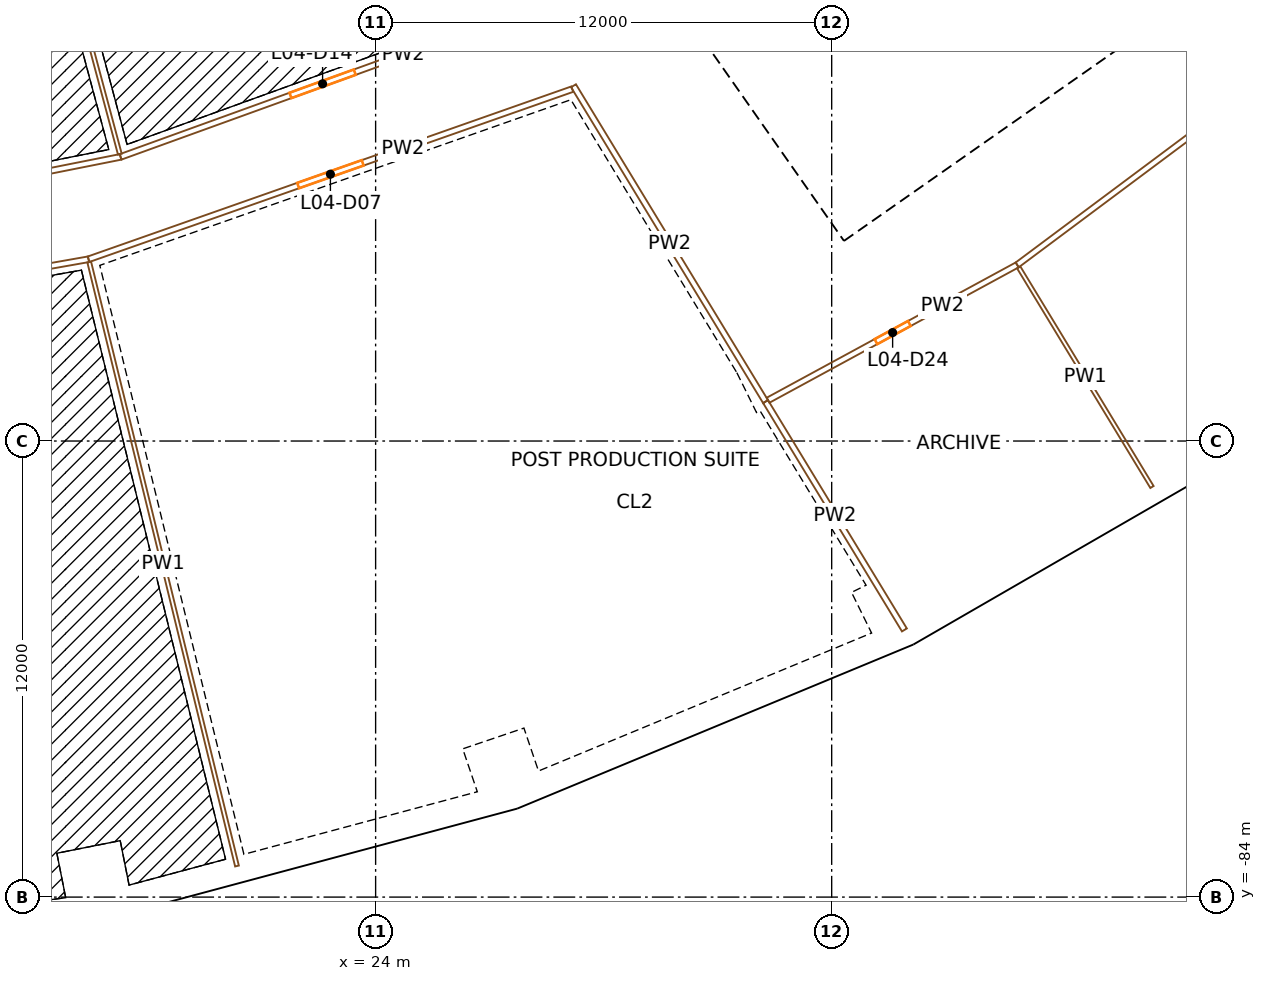
"""IFC4 building model, lengths in metres.
Left out: names, types, materials, properties, quantities, classifications, styles, units other than length and angle.
Written with IfcOpenShell. Run it as: python <this file> out.ifc"""

import sys

from ifc_helpers import new_model, si_unit, direction, frame, frame_2d, origin, origin_2d, place, context, subcontext, project, spatial, rectangle, extrude, element, fill, save


model = new_model("IFC4")
c1 = context("Model", 3, precision=1e-05, world=origin(), true_north=direction((0.0, 1.0)))
c2 = subcontext(c1, "Body", "Model", "MODEL_VIEW")
j1 = project(units=[si_unit("LENGTHUNIT", "METRE"), si_unit("PLANEANGLEUNIT", "RADIAN")], contexts=[c1])
p1 = place(None, origin())
s1 = spatial("IfcSite", under=j1, at=p1, CompositionType="ELEMENT")
p2 = place(p1, origin())
s2 = spatial("IfcBuilding", under=s1, at=p2, CompositionType="ELEMENT")
p3 = place(p2, frame((0.0, 0.0, 31.5)))
s3 = spatial("IfcBuildingStorey", under=s2, at=p3, CompositionType="ELEMENT", Elevation=31.5)
p4 = place(p3, frame((15.168, -76.256, 0.0), z_axis=(0.0, 0.0, 1.0), x_axis=(0.980785280403, 0.195090322016, 0.0)))
e1 = element("IfcColumn", 1, at=p4, inside=s3, PredefinedType="COLUMN", context=c2, shape_type="SweptSolid", body=[
    extrude(rectangle(XDim=1.4, YDim=1.8, at=origin_2d()), origin(), (0.0, 0.0, 1.0), 4.5),
])
p5 = place(p3, frame((16.631, -83.612, 0.0), z_axis=(0.0, 0.0, 1.0), x_axis=(0.980785280403, 0.195090322016, 0.0)))
e2 = element("IfcColumn", 2, at=p5, inside=s3, PredefinedType="COLUMN", context=c2, shape_type="SweptSolid", body=[
    extrude(rectangle(XDim=1.1, YDim=1.3, at=origin_2d()), origin(), (0.0, 0.0, 1.0), 4.5),
])
p6 = place(p3, frame((24.992, -73.624, 0.0), z_axis=(0.0, 0.0, 1.0), x_axis=(0.946930129495, 0.321439465303, 0.0)))
e3 = element("IfcColumn", 3, at=p6, inside=s3, PredefinedType="COLUMN", context=c2, shape_type="SweptSolid", body=[
    extrude(rectangle(XDim=1.4, YDim=1.8, at=origin_2d()), origin(), (0.0, 0.0, 1.0), 4.5),
])
p7 = place(p3, frame((27.403, -80.726, 0.0), z_axis=(0.0, 0.0, 1.0), x_axis=(0.946930129495, 0.321439465303, 0.0)))
e4 = element("IfcColumn", 4, at=p7, inside=s3, PredefinedType="COLUMN", context=c2, shape_type="SweptSolid", body=[
    extrude(rectangle(XDim=1.1, YDim=1.3, at=origin_2d()), origin(), (0.0, 0.0, 1.0), 4.5),
])
p8 = place(p3, frame((34.388, -69.732, 0.0), z_axis=(0.0, 0.0, 1.0), x_axis=(0.896872741533, 0.442288690219, 0.0)))
e5 = element("IfcColumn", 5, at=p8, inside=s3, PredefinedType="COLUMN", context=c2, shape_type="SweptSolid", body=[
    extrude(rectangle(XDim=1.4, YDim=1.8, at=origin_2d()), origin(), (0.0, 0.0, 1.0), 4.5),
])
p9 = place(p3, frame((37.705, -76.458, 0.0), z_axis=(0.0, 0.0, 1.0), x_axis=(0.896872741533, 0.442288690219, 0.0)))
e6 = element("IfcColumn", 6, at=p9, inside=s3, PredefinedType="COLUMN", context=c2, shape_type="SweptSolid", body=[
    extrude(rectangle(XDim=1.1, YDim=1.3, at=origin_2d()), origin(), (0.0, 0.0, 1.0), 4.5),
])
p10 = place(p3, frame((43.196, -64.647, 0.0), z_axis=(0.0, 0.0, 1.0), x_axis=(0.831469612303, 0.55557023302, 0.0)))
e7 = element("IfcColumn", 7, at=p10, inside=s3, PredefinedType="COLUMN", context=c2, shape_type="SweptSolid", body=[
    extrude(rectangle(XDim=1.4, YDim=1.8, at=origin_2d()), origin(), (0.0, 0.0, 1.0), 4.5),
])
p11 = place(p3, frame((36.717, -66.337, 0.0), z_axis=(0.0, 0.0, 1.0), x_axis=(-0.573577477574, 0.819151315216, 0.0)))
e8 = element("IfcWall", 8, at=p11, inside=s3, PredefinedType="SHEAR", context=c2, shape_type="SweptSolid", body=[
    extrude(rectangle(XDim=14.8, YDim=0.9, at=frame_2d((7.4, 0.0))), origin(), (0.0, 0.0, 1.0), 4.1),
])
p12 = place(p11, frame((6.2, 0.0, 0.0)))
e9 = element("IfcOpeningElement", 9, at=p12, cuts=e8, PredefinedType="OPENING", context=c2, shape_type="SweptSolid", body=[
    extrude(rectangle(XDim=2.4, YDim=2.1, at=frame_2d((1.2, 1.05))), frame((0.0, 0.46, 0.0), z_axis=(0.0, -1.0, 0.0), x_axis=(1.0, 0.0, 0.0)), (0.0, 0.0, 1.0), 0.92),
])
p13 = place(p3, frame((36.827, -65.71, 0.0), z_axis=(0.0, 0.0, 1.0), x_axis=(0.819153391756, 0.573574511963, 0.0)))
e10 = element("IfcWall", 10, at=p13, inside=s3, PredefinedType="SHEAR", context=c2, shape_type="SweptSolid", body=[
    extrude(rectangle(XDim=15.045, YDim=0.9, at=frame_2d((7.523, 0.0))), origin(), (0.0, 0.0, 1.0), 4.1),
])
p14 = place(p13, frame((0.6, 0.0, 0.0)))
e11 = element("IfcOpeningElement", 11, at=p14, cuts=e10, PredefinedType="OPENING", context=c2, shape_type="SweptSolid", body=[
    extrude(rectangle(XDim=1.0, YDim=2.1, at=frame_2d((0.5, 1.05))), frame((0.0, 0.46, 0.0), z_axis=(0.0, -1.0, 0.0), x_axis=(1.0, 0.0, 0.0)), (0.0, 0.0, 1.0), 0.92),
])
p15 = place(p13, frame((3.275, 0.0, 0.0)))
e12 = element("IfcOpeningElement", 12, at=p15, cuts=e10, PredefinedType="OPENING", context=c2, shape_type="SweptSolid", body=[
    extrude(rectangle(XDim=1.0, YDim=2.1, at=frame_2d((0.5, 1.05))), frame((0.0, 0.46, 0.0), z_axis=(0.0, -1.0, 0.0), x_axis=(1.0, 0.0, 0.0)), (0.0, 0.0, 1.0), 0.92),
])
p16 = place(p13, frame((6.175, 0.0, 0.0)))
e13 = element("IfcOpeningElement", 13, at=p16, cuts=e10, PredefinedType="OPENING", context=c2, shape_type="SweptSolid", body=[
    extrude(rectangle(XDim=1.0, YDim=2.1, at=frame_2d((0.5, 1.05))), frame((0.0, 0.46, 0.0), z_axis=(0.0, -1.0, 0.0), x_axis=(1.0, 0.0, 0.0)), (0.0, 0.0, 1.0), 0.92),
])
p17 = place(p13, frame((13.495, 0.0, 0.0)))
e14 = element("IfcOpeningElement", 14, at=p17, cuts=e10, PredefinedType="OPENING", context=c2, shape_type="SweptSolid", body=[
    extrude(rectangle(XDim=1.1, YDim=2.1, at=frame_2d((0.55, 1.05))), frame((0.0, 0.46, 0.0), z_axis=(0.0, -1.0, 0.0), x_axis=(1.0, 0.0, 0.0)), (0.0, 0.0, 1.0), 0.92),
])
p18 = place(p3, frame((35.221, -63.417, 0.0), z_axis=(0.0, 0.0, 1.0), x_axis=(0.819166993208, 0.573555086491, 0.0)))
e15 = element("IfcWall", 15, at=p18, inside=s3, PredefinedType="SOLIDWALL", context=c2, shape_type="SweptSolid", body=[
    extrude(rectangle(XDim=7.95, YDim=0.3, at=frame_2d((3.975, 0.0))), origin(), (0.0, 0.0, 1.0), 4.1),
])
for number, where, z_axis, x_axis in (
    (16, (37.15, -62.249, 0.0), (0.0, 0.0, 1.0), (0.574, -0.819, 0.0)),
    (17, (39.649, -60.5, 0.0), (0.0, 0.0, 1.0), (0.574, -0.819, 0.0)),
):
    element("IfcWall", number, at=place(p3, frame(where, z_axis=z_axis, x_axis=x_axis)), inside=s3, PredefinedType="PLUMBINGWALL", context=c2, shape_type="SweptSolid", body=[
        extrude(rectangle(XDim=2.2, YDim=0.1, at=frame_2d((1.1, 0.0))), origin(), (0.0, 0.0, 1.0), 4.1),
    ])
p19 = place(p3, frame((16.754, -84.379, 0.0), z_axis=(0.0, 0.0, 1.0), x_axis=(0.965923678926, 0.258827059038, 0.0)))
e18 = element("IfcWall", 18, at=p19, inside=s3, PredefinedType="SOLIDWALL", context=c2, shape_type="SweptSolid", body=[
    extrude(rectangle(XDim=11.312, YDim=0.45, at=frame_2d((5.656, 0.0))), origin(), (0.0, 0.0, 1.0), 3.2),
])
p20 = place(p19, frame((4.006, 0.0, 0.9)))
e19 = element("IfcOpeningElement", 19, at=p20, cuts=e18, PredefinedType="OPENING", context=c2, shape_type="SweptSolid", body=[
    extrude(rectangle(XDim=1.2, YDim=2.15, at=frame_2d((0.6, 1.075))), frame((0.0, 0.235, 0.0), z_axis=(0.0, -1.0, 0.0), x_axis=(1.0, 0.0, 0.0)), (0.0, 0.0, 1.0), 0.47),
])
p21 = place(p19, frame((6.106, 0.0, 0.9)))
e20 = element("IfcOpeningElement", 20, at=p21, cuts=e18, PredefinedType="OPENING", context=c2, shape_type="SweptSolid", body=[
    extrude(rectangle(XDim=1.2, YDim=2.15, at=frame_2d((0.6, 1.075))), frame((0.0, 0.235, 0.0), z_axis=(0.0, -1.0, 0.0), x_axis=(1.0, 0.0, 0.0)), (0.0, 0.0, 1.0), 0.47),
])
p22 = place(p3, frame((27.706, -81.437, 0.0), z_axis=(0.0, 0.0, 1.0), x_axis=(0.923874126662, 0.382696482978, 0.0)))
e21 = element("IfcWall", 21, at=p22, inside=s3, PredefinedType="SOLIDWALL", context=c2, shape_type="SweptSolid", body=[
    extrude(rectangle(XDim=11.135, YDim=0.45, at=frame_2d((5.567, 0.0))), origin(), (0.0, 0.0, 1.0), 3.2),
])
p23 = place(p22, frame((3.917, 0.0, 0.9)))
e22 = element("IfcOpeningElement", 22, at=p23, cuts=e21, PredefinedType="OPENING", context=c2, shape_type="SweptSolid", body=[
    extrude(rectangle(XDim=1.2, YDim=2.15, at=frame_2d((0.6, 1.075))), frame((0.0, 0.235, 0.0), z_axis=(0.0, -1.0, 0.0), x_axis=(1.0, 0.0, 0.0)), (0.0, 0.0, 1.0), 0.47),
])
p24 = place(p22, frame((6.017, 0.0, 0.9)))
e23 = element("IfcOpeningElement", 23, at=p24, cuts=e21, PredefinedType="OPENING", context=c2, shape_type="SweptSolid", body=[
    extrude(rectangle(XDim=1.2, YDim=2.15, at=frame_2d((0.6, 1.075))), frame((0.0, 0.235, 0.0), z_axis=(0.0, -1.0, 0.0), x_axis=(1.0, 0.0, 0.0)), (0.0, 0.0, 1.0), 0.47),
])
p25 = place(p3, frame((38.022, -77.168, 0.0), z_axis=(0.0, 0.0, 1.0), x_axis=(0.866024577697, 0.500001430823, 0.0)))
e24 = element("IfcWall", 24, at=p25, inside=s3, PredefinedType="SOLIDWALL", context=c2, shape_type="SweptSolid", body=[
    extrude(rectangle(XDim=11.312, YDim=0.45, at=frame_2d((5.656, 0.0))), origin(), (0.0, 0.0, 1.0), 3.2),
])
p26 = place(p25, frame((4.006, 0.0, 0.9)))
e25 = element("IfcOpeningElement", 25, at=p26, cuts=e24, PredefinedType="OPENING", context=c2, shape_type="SweptSolid", body=[
    extrude(rectangle(XDim=1.2, YDim=2.15, at=frame_2d((0.6, 1.075))), frame((0.0, 0.235, 0.0), z_axis=(0.0, -1.0, 0.0), x_axis=(1.0, 0.0, 0.0)), (0.0, 0.0, 1.0), 0.47),
])
p27 = place(p25, frame((6.106, 0.0, 0.9)))
e26 = element("IfcOpeningElement", 26, at=p27, cuts=e24, PredefinedType="OPENING", context=c2, shape_type="SweptSolid", body=[
    extrude(rectangle(XDim=1.2, YDim=2.15, at=frame_2d((0.6, 1.075))), frame((0.0, 0.235, 0.0), z_axis=(0.0, -1.0, 0.0), x_axis=(1.0, 0.0, 0.0)), (0.0, 0.0, 1.0), 0.47),
])
p28 = place(p3, frame((16.446, -67.217, 0.0), z_axis=(0.0, 0.0, 1.0), x_axis=(-0.984813412134, -0.173616080133, 0.0)))
e27 = element("IfcWall", 27, at=p28, inside=s3, PredefinedType="PARTITIONING", context=c2, shape_type="SweptSolid", body=[
    extrude(rectangle(XDim=9.052, YDim=0.15, at=frame_2d((4.526, 0.0))), origin(), (0.0, 0.0, 1.0), 3.1),
])
p29 = place(p28, frame((3.626, 0.0, 0.0)))
e28 = element("IfcOpeningElement", 28, at=p29, cuts=e27, PredefinedType="OPENING", context=c2, shape_type="SweptSolid", body=[
    extrude(rectangle(XDim=1.8, YDim=2.1, at=frame_2d((0.9, 1.05))), frame((0.0, 0.085, 0.0), z_axis=(0.0, -1.0, 0.0), x_axis=(1.0, 0.0, 0.0)), (0.0, 0.0, 1.0), 0.17),
])
p30 = place(p3, frame((8.719, -66.229, 0.0), z_axis=(0.0, 0.0, 1.0), x_axis=(0.980786466832, 0.195084357342, 0.0)))
e29 = element("IfcWall", 29, at=p30, inside=s3, PredefinedType="PARTITIONING", context=c2, shape_type="SweptSolid", body=[
    extrude(rectangle(XDim=8.738, YDim=0.15, at=frame_2d((4.369, 0.0))), origin(), (0.0, 0.0, 1.0), 3.1),
])
p31 = place(p30, frame((3.869, 0.0, 0.0)))
e30 = element("IfcOpeningElement", 30, at=p31, cuts=e29, PredefinedType="OPENING", context=c2, shape_type="SweptSolid", body=[
    extrude(rectangle(XDim=1.0, YDim=2.1, at=frame_2d((0.5, 1.05))), frame((0.0, 0.085, 0.0), z_axis=(0.0, -1.0, 0.0), x_axis=(1.0, 0.0, 0.0)), (0.0, 0.0, 1.0), 0.17),
])
p32 = place(p3, frame((12.965, -48.386, 0.0), z_axis=(0.0, 0.0, 1.0), x_axis=(0.258824622624, -0.965924331779, 0.0)))
e31 = element("IfcWall", 31, at=p32, inside=s3, PredefinedType="PARTITIONING", context=c2, shape_type="SweptSolid", body=[
    extrude(rectangle(XDim=16.632, YDim=0.1, at=frame_2d((8.316, 0.0))), origin(), (0.0, 0.0, 1.0), 3.1),
])
p33 = place(p3, frame((29.175, -62.741, 0.0), z_axis=(0.0, 0.0, 1.0), x_axis=(-0.94336986797, -0.33174281033, 0.0)))
e32 = element("IfcWall", 32, at=p33, inside=s3, PredefinedType="PARTITIONING", context=c2, shape_type="SweptSolid", body=[
    extrude(rectangle(XDim=13.493, YDim=0.15, at=frame_2d((6.746, 0.0))), origin(), (0.0, 0.0, 1.0), 3.1),
])
p34 = place(p33, frame((5.846, 0.0, 0.0)))
e33 = element("IfcOpeningElement", 33, at=p34, cuts=e32, PredefinedType="OPENING", context=c2, shape_type="SweptSolid", body=[
    extrude(rectangle(XDim=1.8, YDim=2.1, at=frame_2d((0.9, 1.05))), frame((0.0, 0.085, 0.0), z_axis=(0.0, -1.0, 0.0), x_axis=(1.0, 0.0, 0.0)), (0.0, 0.0, 1.0), 0.17),
])
p35 = place(p3, frame((17.289, -64.524, 0.0), z_axis=(0.0, 0.0, 1.0), x_axis=(0.940369024046, 0.340155991589, 0.0)))
e34 = element("IfcWall", 34, at=p35, inside=s3, PredefinedType="PARTITIONING", context=c2, shape_type="SweptSolid", body=[
    extrude(rectangle(XDim=11.305, YDim=0.15, at=frame_2d((5.652, 0.0))), origin(), (0.0, 0.0, 1.0), 3.1),
])
p36 = place(p35, frame((4.752, 0.0, 0.0)))
e35 = element("IfcOpeningElement", 35, at=p36, cuts=e34, PredefinedType="OPENING", context=c2, shape_type="SweptSolid", body=[
    extrude(rectangle(XDim=1.8, YDim=2.1, at=frame_2d((0.9, 1.05))), frame((0.0, 0.085, 0.0), z_axis=(0.0, -1.0, 0.0), x_axis=(1.0, 0.0, 0.0)), (0.0, 0.0, 1.0), 0.17),
])
p37 = place(p3, frame((20.352, -83.182, 0.0), z_axis=(0.0, 0.0, 1.0), x_axis=(-0.23765209547, 0.971350339228, 0.0)))
e36 = element("IfcWall", 36, at=p37, inside=s3, PredefinedType="PARTITIONING", context=c2, shape_type="SweptSolid", body=[
    extrude(rectangle(XDim=16.361, YDim=0.1, at=frame_2d((8.18, 0.0))), origin(), (0.0, 0.0, 1.0), 3.1),
])
p38 = place(p3, frame((29.207, -62.652, 0.0), z_axis=(0.0, 0.0, 1.0), x_axis=(0.519573423316, -0.854425805897, 0.0)))
e37 = element("IfcWall", 37, at=p38, inside=s3, PredefinedType="PARTITIONING", context=c2, shape_type="SweptSolid", body=[
    extrude(rectangle(XDim=9.726, YDim=0.15, at=frame_2d((4.863, 0.0))), origin(), (0.0, 0.0, 1.0), 3.1),
])
p39 = place(p3, frame((34.26, -70.963, 0.0), z_axis=(0.0, 0.0, 1.0), x_axis=(0.519582317334, -0.854420397412, 0.0)))
e38 = element("IfcWall", 38, at=p39, inside=s3, PredefinedType="PARTITIONING", context=c2, shape_type="SweptSolid", body=[
    extrude(rectangle(XDim=7.032, YDim=0.15, at=frame_2d((3.516, 0.0))), origin(), (0.0, 0.0, 1.0), 3.1),
])
p40 = place(p3, frame((40.881, -67.366, 0.0), z_axis=(0.0, 0.0, 1.0), x_axis=(-0.87872597875, -0.477326569835, 0.0)))
e39 = element("IfcWall", 39, at=p40, inside=s3, PredefinedType="PARTITIONING", context=c2, shape_type="SweptSolid", body=[
    extrude(rectangle(XDim=7.46, YDim=0.15, at=frame_2d((3.73, 0.0))), origin(), (0.0, 0.0, 1.0), 3.1),
])
p41 = place(p40, frame((3.23, 0.0, 0.0)))
e40 = element("IfcOpeningElement", 40, at=p41, cuts=e39, PredefinedType="OPENING", context=c2, shape_type="SweptSolid", body=[
    extrude(rectangle(XDim=1.0, YDim=2.1, at=frame_2d((0.5, 1.05))), frame((0.0, 0.085, 0.0), z_axis=(0.0, -1.0, 0.0), x_axis=(1.0, 0.0, 0.0)), (0.0, 0.0, 1.0), 0.17),
])
p42 = place(p3, frame((52.875, -58.417, 0.0), z_axis=(0.0, 0.0, 1.0), x_axis=(-0.801483412858, -0.598017005539, 0.0)))
e41 = element("IfcWall", 41, at=p42, inside=s3, PredefinedType="PARTITIONING", context=c2, shape_type="SweptSolid", body=[
    extrude(rectangle(XDim=14.965, YDim=0.15, at=frame_2d((7.483, 0.0))), origin(), (0.0, 0.0, 1.0), 3.1),
])
p43 = place(p42, frame((6.983, 0.0, 0.0)))
e42 = element("IfcOpeningElement", 42, at=p43, cuts=e41, PredefinedType="OPENING", context=c2, shape_type="SweptSolid", body=[
    extrude(rectangle(XDim=1.0, YDim=2.1, at=frame_2d((0.5, 1.05))), frame((0.0, 0.085, 0.0), z_axis=(0.0, -1.0, 0.0), x_axis=(1.0, 0.0, 0.0)), (0.0, 0.0, 1.0), 0.17),
])
p44 = place(p3, frame((44.428, -73.21, 0.0), z_axis=(0.0, 0.0, 1.0), x_axis=(-0.518790606157, 0.85490134341, 0.0)))
e43 = element("IfcWall", 43, at=p44, inside=s3, PredefinedType="PARTITIONING", context=c2, shape_type="SweptSolid", body=[
    extrude(rectangle(XDim=6.761, YDim=0.1, at=frame_2d((3.38, 0.0))), origin(), (0.0, 0.0, 1.0), 3.1),
])
p45 = place(p14, origin())
e44 = element("IfcDoor", 44, at=p45, inside=s3, OperationType="SINGLE_SWING_RIGHT", PredefinedType="DOOR", context=c2, shape_type="SweptSolid", body=[
    extrude(rectangle(XDim=1.0, YDim=2.1, at=frame_2d((0.5, 1.05))), frame((0.0, 0.025, 0.0), z_axis=(0.0, -1.0, 0.0), x_axis=(1.0, 0.0, 0.0)), (0.0, 0.0, 1.0), 0.05),
])
fill(e11, e44)
p46 = place(p15, origin())
e45 = element("IfcDoor", 45, at=p46, inside=s3, OperationType="SINGLE_SWING_LEFT", PredefinedType="DOOR", context=c2, shape_type="SweptSolid", body=[
    extrude(rectangle(XDim=1.0, YDim=2.1, at=frame_2d((0.5, 1.05))), frame((0.0, 0.025, 0.0), z_axis=(0.0, -1.0, 0.0), x_axis=(1.0, 0.0, 0.0)), (0.0, 0.0, 1.0), 0.05),
])
fill(e12, e45)
p47 = place(p16, origin())
e46 = element("IfcDoor", 46, at=p47, inside=s3, OperationType="SINGLE_SWING_RIGHT", PredefinedType="DOOR", context=c2, shape_type="SweptSolid", body=[
    extrude(rectangle(XDim=1.0, YDim=2.1, at=frame_2d((0.5, 1.05))), frame((0.0, 0.025, 0.0), z_axis=(0.0, -1.0, 0.0), x_axis=(1.0, 0.0, 0.0)), (0.0, 0.0, 1.0), 0.05),
])
fill(e13, e46)
p48 = place(p20, origin())
e47 = element("IfcWindow", 47, at=p48, inside=s3, PartitioningType="SINGLE_PANEL", PredefinedType="WINDOW", context=c2, shape_type="SweptSolid", body=[
    extrude(rectangle(XDim=1.2, YDim=2.15, at=frame_2d((0.6, 1.075))), frame((0.0, 0.03, 0.0), z_axis=(0.0, -1.0, 0.0), x_axis=(1.0, 0.0, 0.0)), (0.0, 0.0, 1.0), 0.06),
])
fill(e19, e47)
p49 = place(p21, origin())
e48 = element("IfcWindow", 48, at=p49, inside=s3, PartitioningType="SINGLE_PANEL", PredefinedType="WINDOW", context=c2, shape_type="SweptSolid", body=[
    extrude(rectangle(XDim=1.2, YDim=2.15, at=frame_2d((0.6, 1.075))), frame((0.0, 0.03, 0.0), z_axis=(0.0, -1.0, 0.0), x_axis=(1.0, 0.0, 0.0)), (0.0, 0.0, 1.0), 0.06),
])
fill(e20, e48)
p50 = place(p23, origin())
e49 = element("IfcWindow", 49, at=p50, inside=s3, PartitioningType="SINGLE_PANEL", PredefinedType="WINDOW", context=c2, shape_type="SweptSolid", body=[
    extrude(rectangle(XDim=1.2, YDim=2.15, at=frame_2d((0.6, 1.075))), frame((0.0, 0.03, 0.0), z_axis=(0.0, -1.0, 0.0), x_axis=(1.0, 0.0, 0.0)), (0.0, 0.0, 1.0), 0.06),
])
fill(e22, e49)
p51 = place(p24, origin())
e50 = element("IfcWindow", 50, at=p51, inside=s3, PartitioningType="SINGLE_PANEL", PredefinedType="WINDOW", context=c2, shape_type="SweptSolid", body=[
    extrude(rectangle(XDim=1.2, YDim=2.15, at=frame_2d((0.6, 1.075))), frame((0.0, 0.03, 0.0), z_axis=(0.0, -1.0, 0.0), x_axis=(1.0, 0.0, 0.0)), (0.0, 0.0, 1.0), 0.06),
])
fill(e23, e50)
p52 = place(p26, origin())
e51 = element("IfcWindow", 51, at=p52, inside=s3, PartitioningType="SINGLE_PANEL", PredefinedType="WINDOW", context=c2, shape_type="SweptSolid", body=[
    extrude(rectangle(XDim=1.2, YDim=2.15, at=frame_2d((0.6, 1.075))), frame((0.0, 0.03, 0.0), z_axis=(0.0, -1.0, 0.0), x_axis=(1.0, 0.0, 0.0)), (0.0, 0.0, 1.0), 0.06),
])
fill(e25, e51)
p53 = place(p27, origin())
e52 = element("IfcWindow", 52, at=p53, inside=s3, PartitioningType="SINGLE_PANEL", PredefinedType="WINDOW", context=c2, shape_type="SweptSolid", body=[
    extrude(rectangle(XDim=1.2, YDim=2.15, at=frame_2d((0.6, 1.075))), frame((0.0, 0.03, 0.0), z_axis=(0.0, -1.0, 0.0), x_axis=(1.0, 0.0, 0.0)), (0.0, 0.0, 1.0), 0.06),
])
fill(e26, e52)
p54 = place(p34, origin())
e53 = element("IfcDoor", 53, at=p54, inside=s3, OperationType="DOUBLE_DOOR_SINGLE_SWING", PredefinedType="DOOR", context=c2, shape_type="SweptSolid", body=[
    extrude(rectangle(XDim=1.8, YDim=2.1, at=frame_2d((0.9, 1.05))), frame((0.0, 0.025, 0.0), z_axis=(0.0, -1.0, 0.0), x_axis=(1.0, 0.0, 0.0)), (0.0, 0.0, 1.0), 0.05),
])
fill(e33, e53)
p55 = place(p36, origin())
e54 = element("IfcDoor", 54, at=p55, inside=s3, OperationType="DOUBLE_DOOR_SINGLE_SWING", PredefinedType="DOOR", context=c2, shape_type="SweptSolid", body=[
    extrude(rectangle(XDim=1.8, YDim=2.1, at=frame_2d((0.9, 1.05))), frame((0.0, 0.025, 0.0), z_axis=(0.0, -1.0, 0.0), x_axis=(1.0, 0.0, 0.0)), (0.0, 0.0, 1.0), 0.05),
])
fill(e35, e54)
p56 = place(p41, origin())
e55 = element("IfcDoor", 55, at=p56, inside=s3, OperationType="SINGLE_SWING_RIGHT", PredefinedType="DOOR", context=c2, shape_type="SweptSolid", body=[
    extrude(rectangle(XDim=1.0, YDim=2.1, at=frame_2d((0.5, 1.05))), frame((0.0, 0.025, 0.0), z_axis=(0.0, -1.0, 0.0), x_axis=(1.0, 0.0, 0.0)), (0.0, 0.0, 1.0), 0.05),
])
fill(e40, e55)
save(model, sys.argv[1])
